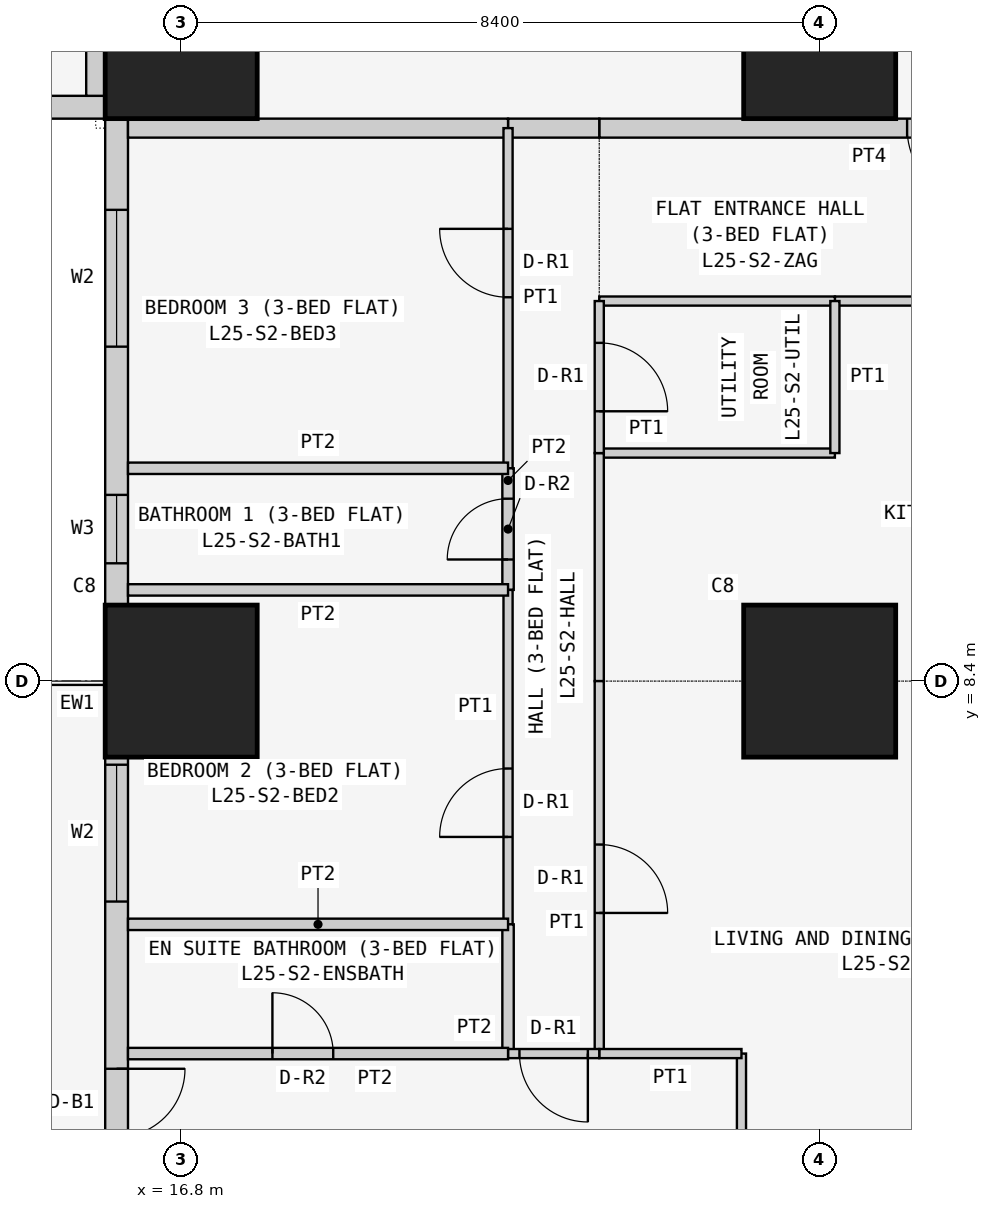
"""IFC4 building model, lengths in metres.
Left out: names, types, materials, properties, quantities, classifications, styles, units other than length and angle.
Written with IfcOpenShell. Run it as: python <this file> out.ifc"""

import sys

from ifc_helpers import new_model, si_unit, direction, frame, frame_2d, origin, origin_2d, place, context, subcontext, project, spatial, rectangle, extrude, element, fill, save


model = new_model("IFC4")
c1 = context("Model", 3, precision=1e-05, world=origin(), true_north=direction((0.0, 1.0)))
c2 = subcontext(c1, "Body", "Model", "MODEL_VIEW")
j1 = project(units=[si_unit("LENGTHUNIT", "METRE"), si_unit("PLANEANGLEUNIT", "RADIAN")], contexts=[c1])
p1 = place(None, origin())
s1 = spatial("IfcSite", under=j1, at=p1, CompositionType="ELEMENT")
p2 = place(p1, origin())
s2 = spatial("IfcBuilding", under=s1, at=p2, CompositionType="ELEMENT")
p3 = place(p2, frame((0.0, 0.0, 99.3)))
s3 = spatial("IfcBuildingStorey", under=s2, at=p3, CompositionType="ELEMENT", Elevation=99.3)
for number, where, z_axis, x_axis in (
    (1, (16.8, 8.4, 0.0), (0.0, 0.0, 1.0), (1.0, 0.0, 0.0)),
    (2, (16.8, 16.8, 0.0), (0.0, 0.0, 1.0), (1.0, 0.0, 0.0)),
    (3, (25.2, 8.4, 0.0), (0.0, 0.0, 1.0), (1.0, 0.0, 0.0)),
    (4, (25.2, 16.8, 0.0), (0.0, 0.0, 1.0), (1.0, 0.0, 0.0)),
):
    element("IfcColumn", number, at=place(p3, frame(where, z_axis=z_axis, x_axis=x_axis)), inside=s3, PredefinedType="COLUMN", context=c2, shape_type="SweptSolid", body=[
        extrude(rectangle(XDim=2.0, YDim=2.0, at=origin_2d()), origin(), (0.0, 0.0, 1.0), 3.6),
    ])
p4 = place(p3, frame((0.4, 15.95, 0.0), z_axis=(0.0, 0.0, 1.0), x_axis=(1.0, 0.0, 0.0)))
e5 = element("IfcWall", 5, at=p4, inside=s3, PredefinedType="SOLIDWALL", context=c2, shape_type="SweptSolid", body=[
    extrude(rectangle(XDim=15.7, YDim=0.3, at=frame_2d((7.85, 0.0))), origin(), (0.0, 0.0, 1.0), 3.35),
])
p5 = place(p4, frame((12.4, 0.0, 0.9)))
e6 = element("IfcOpeningElement", 6, at=p5, cuts=e5, PredefinedType="OPENING", context=c2, shape_type="SweptSolid", body=[
    extrude(rectangle(XDim=1.8, YDim=1.5, at=frame_2d((0.9, 0.75))), frame((0.0, 0.16, 0.0), z_axis=(0.0, -1.0, 0.0), x_axis=(1.0, 0.0, 0.0)), (0.0, 0.0, 1.0), 0.32),
])
p6 = place(p4, frame((9.55, 0.0, 1.5)))
e7 = element("IfcOpeningElement", 7, at=p6, cuts=e5, PredefinedType="OPENING", context=c2, shape_type="SweptSolid", body=[
    extrude(rectangle(XDim=0.9, YDim=0.7, at=frame_2d((0.45, 0.35))), frame((0.0, 0.16, 0.0), z_axis=(0.0, -1.0, 0.0), x_axis=(1.0, 0.0, 0.0)), (0.0, 0.0, 1.0), 0.32),
])
p7 = place(p4, frame((5.1, 0.0, 0.9)))
e8 = element("IfcOpeningElement", 8, at=p7, cuts=e5, PredefinedType="OPENING", context=c2, shape_type="SweptSolid", body=[
    extrude(rectangle(XDim=1.8, YDim=1.5, at=frame_2d((0.9, 0.75))), frame((0.0, 0.16, 0.0), z_axis=(0.0, -1.0, 0.0), x_axis=(1.0, 0.0, 0.0)), (0.0, 0.0, 1.0), 0.32),
])
p8 = place(p4, frame((2.0, 0.0, 0.0)))
e9 = element("IfcOpeningElement", 9, at=p8, cuts=e5, PredefinedType="OPENING", context=c2, shape_type="SweptSolid", body=[
    extrude(rectangle(XDim=0.9, YDim=2.4, at=frame_2d((0.45, 1.2))), frame((0.0, 0.16, 0.0), z_axis=(0.0, -1.0, 0.0), x_axis=(1.0, 0.0, 0.0)), (0.0, 0.0, 1.0), 0.32),
])
p9 = place(p4, frame((0.7, 0.0, 0.9)))
e10 = element("IfcOpeningElement", 10, at=p9, cuts=e5, PredefinedType="OPENING", context=c2, shape_type="SweptSolid", body=[
    extrude(rectangle(XDim=1.2, YDim=1.5, at=frame_2d((0.6, 0.75))), frame((0.0, 0.16, 0.0), z_axis=(0.0, -1.0, 0.0), x_axis=(1.0, 0.0, 0.0)), (0.0, 0.0, 1.0), 0.32),
])
p10 = place(p3, frame((15.95, 15.8, 0.0), z_axis=(0.0, 0.0, 1.0), x_axis=(0.0, -1.0, 0.0)))
e11 = element("IfcWall", 11, at=p10, inside=s3, PredefinedType="SOLIDWALL", context=c2, shape_type="SweptSolid", body=[
    extrude(rectangle(XDim=15.4, YDim=0.3, at=frame_2d((7.7, 0.0))), origin(), (0.0, 0.0, 1.0), 3.35),
])
p11 = place(p10, frame((1.2, 0.0, 0.9)))
e12 = element("IfcOpeningElement", 12, at=p11, cuts=e11, PredefinedType="OPENING", context=c2, shape_type="SweptSolid", body=[
    extrude(rectangle(XDim=1.8, YDim=1.5, at=frame_2d((0.9, 0.75))), frame((0.0, 0.16, 0.0), z_axis=(0.0, -1.0, 0.0), x_axis=(1.0, 0.0, 0.0)), (0.0, 0.0, 1.0), 0.32),
])
p12 = place(p10, frame((4.95, 0.0, 1.5)))
e13 = element("IfcOpeningElement", 13, at=p12, cuts=e11, PredefinedType="OPENING", context=c2, shape_type="SweptSolid", body=[
    extrude(rectangle(XDim=0.9, YDim=0.7, at=frame_2d((0.45, 0.35))), frame((0.0, 0.16, 0.0), z_axis=(0.0, -1.0, 0.0), x_axis=(1.0, 0.0, 0.0)), (0.0, 0.0, 1.0), 0.32),
])
p13 = place(p10, frame((8.5, 0.0, 0.9)))
e14 = element("IfcOpeningElement", 14, at=p13, cuts=e11, PredefinedType="OPENING", context=c2, shape_type="SweptSolid", body=[
    extrude(rectangle(XDim=1.8, YDim=1.5, at=frame_2d((0.9, 0.75))), frame((0.0, 0.16, 0.0), z_axis=(0.0, -1.0, 0.0), x_axis=(1.0, 0.0, 0.0)), (0.0, 0.0, 1.0), 0.32),
])
p14 = place(p10, frame((12.5, 0.0, 0.0)))
e15 = element("IfcOpeningElement", 15, at=p14, cuts=e11, PredefinedType="OPENING", context=c2, shape_type="SweptSolid", body=[
    extrude(rectangle(XDim=0.9, YDim=2.4, at=frame_2d((0.45, 1.2))), frame((0.0, 0.16, 0.0), z_axis=(0.0, -1.0, 0.0), x_axis=(1.0, 0.0, 0.0)), (0.0, 0.0, 1.0), 0.32),
])
p15 = place(p10, frame((13.5, 0.0, 0.9)))
e16 = element("IfcOpeningElement", 16, at=p15, cuts=e11, PredefinedType="OPENING", context=c2, shape_type="SweptSolid", body=[
    extrude(rectangle(XDim=1.2, YDim=1.5, at=frame_2d((0.6, 0.75))), frame((0.0, 0.16, 0.0), z_axis=(0.0, -1.0, 0.0), x_axis=(1.0, 0.0, 0.0)), (0.0, 0.0, 1.0), 0.32),
])
p16 = place(p3, frame((29.4, 15.675, 0.0), z_axis=(0.0, 0.0, 1.0), x_axis=(-1.0, 0.0, 0.0)))
e17 = element("IfcWall", 17, at=p16, inside=s3, PredefinedType="PARTITIONING", context=c2, shape_type="SweptSolid", body=[
    extrude(rectangle(XDim=7.1, YDim=0.25, at=frame_2d((3.55, 0.0))), origin(), (0.0, 0.0, 1.0), 3.35),
])
p17 = place(p16, frame((2.05, 0.0, 0.0)))
e18 = element("IfcOpeningElement", 18, at=p17, cuts=e17, PredefinedType="OPENING", context=c2, shape_type="SweptSolid", body=[
    extrude(rectangle(XDim=1.0, YDim=2.1, at=frame_2d((0.5, 1.05))), frame((0.0, 0.135, 0.0), z_axis=(0.0, -1.0, 0.0), x_axis=(1.0, 0.0, 0.0)), (0.0, 0.0, 1.0), 0.27),
])
p18 = place(p3, frame((22.3, 15.675, 0.0), z_axis=(0.0, 0.0, 1.0), x_axis=(-1.0, 0.0, 0.0)))
e19 = element("IfcWall", 19, at=p18, inside=s3, PredefinedType="PARTITIONING", context=c2, shape_type="SweptSolid", body=[
    extrude(rectangle(XDim=1.2, YDim=0.25, at=frame_2d((0.6, 0.0))), origin(), (0.0, 0.0, 1.0), 3.35),
])
for number, where, z_axis, x_axis in (
    (20, (21.1, 15.675, 0.0), (0.0, 0.0, 1.0), (-1.0, 0.0, 0.0)),
    (21, (15.675, 16.1, 0.0), (0.0, 0.0, 1.0), (0.0, 1.0, 0.0)),
):
    element("IfcWall", number, at=place(p3, frame(where, z_axis=z_axis, x_axis=x_axis)), inside=s3, PredefinedType="PARTITIONING", context=c2, shape_type="SweptSolid", body=[
        extrude(rectangle(XDim=5.0, YDim=0.25, at=frame_2d((2.5, 0.0))), origin(), (0.0, 0.0, 1.0), 3.35),
    ])
p19 = place(p3, frame((29.4, 13.4, 0.0), z_axis=(0.0, 0.0, 1.0), x_axis=(-1.0, 0.0, 0.0)))
e22 = element("IfcWall", 22, at=p19, inside=s3, PredefinedType="PARTITIONING", context=c2, shape_type="SweptSolid", body=[
    extrude(rectangle(XDim=4.0, YDim=0.12, at=frame_2d((2.0, 0.0))), origin(), (0.0, 0.0, 1.0), 3.35),
])
p20 = place(p19, frame((1.05, 0.0, 0.0)))
e23 = element("IfcOpeningElement", 23, at=p20, cuts=e22, PredefinedType="OPENING", context=c2, shape_type="SweptSolid", body=[
    extrude(rectangle(XDim=0.9, YDim=2.1, at=frame_2d((0.45, 1.05))), frame((0.0, 0.07, 0.0), z_axis=(0.0, -1.0, 0.0), x_axis=(1.0, 0.0, 0.0)), (0.0, 0.0, 1.0), 0.14),
])
for number, where, z_axis, x_axis in (
    (24, (25.4, 13.4, 0.0), (0.0, 0.0, 1.0), (-1.0, 0.0, 0.0)),
    (25, (22.3, 11.4, 0.0), (0.0, 0.0, 1.0), (1.0, 0.0, 0.0)),
):
    element("IfcWall", number, at=place(p3, frame(where, z_axis=z_axis, x_axis=x_axis)), inside=s3, PredefinedType="PARTITIONING", context=c2, shape_type="SweptSolid", body=[
        extrude(rectangle(XDim=3.1, YDim=0.12, at=frame_2d((1.55, 0.0))), origin(), (0.0, 0.0, 1.0), 3.35),
    ])
p21 = place(p3, frame((25.4, 11.4, 0.0), z_axis=(0.0, 0.0, 1.0), x_axis=(0.0, 1.0, 0.0)))
e26 = element("IfcWall", 26, at=p21, inside=s3, PredefinedType="PARTITIONING", context=c2, shape_type="SweptSolid", body=[
    extrude(rectangle(XDim=2.0, YDim=0.12, at=frame_2d((1.0, 0.0))), origin(), (0.0, 0.0, 1.0), 3.35),
])
p22 = place(p3, frame((22.3, 8.4, 0.0), z_axis=(0.0, 0.0, 1.0), x_axis=(0.0, 1.0, 0.0)))
e27 = element("IfcWall", 27, at=p22, inside=s3, PredefinedType="PARTITIONING", context=c2, shape_type="SweptSolid", body=[
    extrude(rectangle(XDim=3.0, YDim=0.12, at=frame_2d((1.5, 0.0))), origin(), (0.0, 0.0, 1.0), 3.35),
])
p23 = place(p3, frame((22.3, 11.4, 0.0), z_axis=(0.0, 0.0, 1.0), x_axis=(0.0, 1.0, 0.0)))
e28 = element("IfcWall", 28, at=p23, inside=s3, PredefinedType="PARTITIONING", context=c2, shape_type="SweptSolid", body=[
    extrude(rectangle(XDim=2.0, YDim=0.12, at=frame_2d((1.0, 0.0))), origin(), (0.0, 0.0, 1.0), 3.35),
])
p24 = place(p23, frame((0.55, 0.0, 0.0)))
e29 = element("IfcOpeningElement", 29, at=p24, cuts=e28, PredefinedType="OPENING", context=c2, shape_type="SweptSolid", body=[
    extrude(rectangle(XDim=0.9, YDim=2.1, at=frame_2d((0.45, 1.05))), frame((0.0, 0.07, 0.0), z_axis=(0.0, -1.0, 0.0), x_axis=(1.0, 0.0, 0.0)), (0.0, 0.0, 1.0), 0.14),
])
p25 = place(p3, frame((22.3, 3.5, 0.0), z_axis=(0.0, 0.0, 1.0), x_axis=(0.0, 1.0, 0.0)))
e30 = element("IfcWall", 30, at=p25, inside=s3, PredefinedType="PARTITIONING", context=c2, shape_type="SweptSolid", body=[
    extrude(rectangle(XDim=4.9, YDim=0.12, at=frame_2d((2.45, 0.0))), origin(), (0.0, 0.0, 1.0), 3.35),
])
p26 = place(p25, frame((1.85, 0.0, 0.0)))
e31 = element("IfcOpeningElement", 31, at=p26, cuts=e30, PredefinedType="OPENING", context=c2, shape_type="SweptSolid", body=[
    extrude(rectangle(XDim=0.9, YDim=2.1, at=frame_2d((0.45, 1.05))), frame((0.0, 0.07, 0.0), z_axis=(0.0, -1.0, 0.0), x_axis=(1.0, 0.0, 0.0)), (0.0, 0.0, 1.0), 0.14),
])
p27 = place(p3, frame((24.171, -0.65, 0.0), z_axis=(0.0, 0.0, 1.0), x_axis=(0.0, 1.0, 0.0)))
e32 = element("IfcWall", 32, at=p27, inside=s3, PredefinedType="PARTITIONING", context=c2, shape_type="SweptSolid", body=[
    extrude(rectangle(XDim=4.15, YDim=0.12, at=frame_2d((2.075, 0.0))), origin(), (0.0, 0.0, 1.0), 3.35),
])
p28 = place(p3, frame((24.171, 3.5, 0.0), z_axis=(0.0, 0.0, 1.0), x_axis=(-1.0, 0.0, 0.0)))
e33 = element("IfcWall", 33, at=p28, inside=s3, PredefinedType="PARTITIONING", context=c2, shape_type="SweptSolid", body=[
    extrude(rectangle(XDim=1.871, YDim=0.12, at=frame_2d((0.936, 0.0))), origin(), (0.0, 0.0, 1.0), 3.35),
])
p29 = place(p3, frame((21.1, 11.2, 0.0), z_axis=(0.0, 0.0, 1.0), x_axis=(0.0, 1.0, 0.0)))
e34 = element("IfcWall", 34, at=p29, inside=s3, PredefinedType="PARTITIONING", context=c2, shape_type="SweptSolid", body=[
    extrude(rectangle(XDim=4.475, YDim=0.12, at=frame_2d((2.238, 0.0))), origin(), (0.0, 0.0, 1.0), 2.667),
])
p30 = place(p29, frame((2.25, 0.0, 0.0)))
e35 = element("IfcOpeningElement", 35, at=p30, cuts=e34, PredefinedType="OPENING", context=c2, shape_type="SweptSolid", body=[
    extrude(rectangle(XDim=0.9, YDim=2.1, at=frame_2d((0.45, 1.05))), frame((0.0, 0.07, 0.0), z_axis=(0.0, -1.0, 0.0), x_axis=(1.0, 0.0, 0.0)), (0.0, 0.0, 1.0), 0.14),
])
p31 = place(p3, frame((21.1, 9.6, 0.0), z_axis=(0.0, 0.0, 1.0), x_axis=(0.0, 1.0, 0.0)))
e36 = element("IfcWall", 36, at=p31, inside=s3, PredefinedType="PARTITIONING", context=c2, shape_type="SweptSolid", body=[
    extrude(rectangle(XDim=1.6, YDim=0.15, at=frame_2d((0.8, 0.0))), origin(), (0.0, 0.0, 1.0), 2.667),
])
p32 = place(p31, frame((0.4, 0.0, 0.0)))
e37 = element("IfcOpeningElement", 37, at=p32, cuts=e36, PredefinedType="OPENING", context=c2, shape_type="SweptSolid", body=[
    extrude(rectangle(XDim=0.8, YDim=2.1, at=frame_2d((0.4, 1.05))), frame((0.0, 0.085, 0.0), z_axis=(0.0, -1.0, 0.0), x_axis=(1.0, 0.0, 0.0)), (0.0, 0.0, 1.0), 0.17),
])
p33 = place(p3, frame((21.1, 5.2, 0.0), z_axis=(0.0, 0.0, 1.0), x_axis=(0.0, 1.0, 0.0)))
e38 = element("IfcWall", 38, at=p33, inside=s3, PredefinedType="PARTITIONING", context=c2, shape_type="SweptSolid", body=[
    extrude(rectangle(XDim=4.4, YDim=0.12, at=frame_2d((2.2, 0.0))), origin(), (0.0, 0.0, 1.0), 2.667),
])
p34 = place(p33, frame((1.15, 0.0, 0.0)))
e39 = element("IfcOpeningElement", 39, at=p34, cuts=e38, PredefinedType="OPENING", context=c2, shape_type="SweptSolid", body=[
    extrude(rectangle(XDim=0.9, YDim=2.1, at=frame_2d((0.45, 1.05))), frame((0.0, 0.07, 0.0), z_axis=(0.0, -1.0, 0.0), x_axis=(1.0, 0.0, 0.0)), (0.0, 0.0, 1.0), 0.14),
])
p35 = place(p3, frame((21.1, 3.5, 0.0), z_axis=(0.0, 0.0, 1.0), x_axis=(0.0, 1.0, 0.0)))
e40 = element("IfcWall", 40, at=p35, inside=s3, PredefinedType="PARTITIONING", context=c2, shape_type="SweptSolid", body=[
    extrude(rectangle(XDim=1.7, YDim=0.15, at=frame_2d((0.85, 0.0))), origin(), (0.0, 0.0, 1.0), 2.667),
])
p36 = place(p3, frame((22.3, 3.5, 0.0), z_axis=(0.0, 0.0, 1.0), x_axis=(-1.0, 0.0, 0.0)))
e41 = element("IfcWall", 41, at=p36, inside=s3, PredefinedType="PARTITIONING", context=c2, shape_type="SweptSolid", body=[
    extrude(rectangle(XDim=1.2, YDim=0.12, at=frame_2d((0.6, 0.0))), origin(), (0.0, 0.0, 1.0), 3.35),
])
p37 = place(p36, frame((0.15, 0.0, 0.0)))
e42 = element("IfcOpeningElement", 42, at=p37, cuts=e41, PredefinedType="OPENING", context=c2, shape_type="SweptSolid", body=[
    extrude(rectangle(XDim=0.9, YDim=2.1, at=frame_2d((0.45, 1.05))), frame((0.0, 0.07, 0.0), z_axis=(0.0, -1.0, 0.0), x_axis=(1.0, 0.0, 0.0)), (0.0, 0.0, 1.0), 0.14),
])
for number, where, z_axis, x_axis in (
    (43, (21.1, 11.2, 0.0), (0.0, 0.0, 1.0), (-1.0, 0.0, 0.0)),
    (44, (21.1, 9.6, 0.0), (0.0, 0.0, 1.0), (-1.0, 0.0, 0.0)),
    (45, (21.1, 5.2, 0.0), (0.0, 0.0, 1.0), (-1.0, 0.0, 0.0)),
):
    element("IfcWall", number, at=place(p3, frame(where, z_axis=z_axis, x_axis=x_axis)), inside=s3, PredefinedType="PARTITIONING", context=c2, shape_type="SweptSolid", body=[
        extrude(rectangle(XDim=5.0, YDim=0.15, at=frame_2d((2.5, 0.0))), origin(), (0.0, 0.0, 1.0), 3.35),
    ])
p38 = place(p3, frame((21.1, 3.5, 0.0), z_axis=(0.0, 0.0, 1.0), x_axis=(-1.0, 0.0, 0.0)))
e46 = element("IfcWall", 46, at=p38, inside=s3, PredefinedType="PARTITIONING", context=c2, shape_type="SweptSolid", body=[
    extrude(rectangle(XDim=5.0, YDim=0.15, at=frame_2d((2.5, 0.0))), origin(), (0.0, 0.0, 1.0), 3.35),
])
p39 = place(p38, frame((2.3, 0.0, 0.0)))
e47 = element("IfcOpeningElement", 47, at=p39, cuts=e46, PredefinedType="OPENING", context=c2, shape_type="SweptSolid", body=[
    extrude(rectangle(XDim=0.8, YDim=2.1, at=frame_2d((0.4, 1.05))), frame((0.0, 0.085, 0.0), z_axis=(0.0, -1.0, 0.0), x_axis=(1.0, 0.0, 0.0)), (0.0, 0.0, 1.0), 0.17),
])
p40 = place(p11, origin())
e48 = element("IfcWindow", 48, at=p40, inside=s3, PartitioningType="SINGLE_PANEL", PredefinedType="WINDOW", context=c2, shape_type="SweptSolid", body=[
    extrude(rectangle(XDim=1.8, YDim=1.5, at=frame_2d((0.9, 0.75))), frame((0.0, 0.03, 0.0), z_axis=(0.0, -1.0, 0.0), x_axis=(1.0, 0.0, 0.0)), (0.0, 0.0, 1.0), 0.06),
])
fill(e12, e48)
p41 = place(p12, origin())
e49 = element("IfcWindow", 49, at=p41, inside=s3, PartitioningType="SINGLE_PANEL", PredefinedType="WINDOW", context=c2, shape_type="SweptSolid", body=[
    extrude(rectangle(XDim=0.9, YDim=0.7, at=frame_2d((0.45, 0.35))), frame((0.0, 0.03, 0.0), z_axis=(0.0, -1.0, 0.0), x_axis=(1.0, 0.0, 0.0)), (0.0, 0.0, 1.0), 0.06),
])
fill(e13, e49)
p42 = place(p13, origin())
e50 = element("IfcWindow", 50, at=p42, inside=s3, PartitioningType="SINGLE_PANEL", PredefinedType="WINDOW", context=c2, shape_type="SweptSolid", body=[
    extrude(rectangle(XDim=1.8, YDim=1.5, at=frame_2d((0.9, 0.75))), frame((0.0, 0.03, 0.0), z_axis=(0.0, -1.0, 0.0), x_axis=(1.0, 0.0, 0.0)), (0.0, 0.0, 1.0), 0.06),
])
fill(e14, e50)
p43 = place(p14, origin())
e51 = element("IfcDoor", 51, at=p43, inside=s3, OperationType="SINGLE_SWING_LEFT", PredefinedType="DOOR", context=c2, shape_type="SweptSolid", body=[
    extrude(rectangle(XDim=0.9, YDim=2.4, at=frame_2d((0.45, 1.2))), frame((0.0, 0.025, 0.0), z_axis=(0.0, -1.0, 0.0), x_axis=(1.0, 0.0, 0.0)), (0.0, 0.0, 1.0), 0.05),
])
fill(e15, e51)
p44 = place(p17, origin())
e52 = element("IfcDoor", 52, at=p44, inside=s3, OperationType="SINGLE_SWING_LEFT", PredefinedType="DOOR", context=c2, shape_type="SweptSolid", body=[
    extrude(rectangle(XDim=1.0, YDim=2.1, at=frame_2d((0.5, 1.05))), frame((0.0, 0.025, 0.0), z_axis=(0.0, -1.0, 0.0), x_axis=(1.0, 0.0, 0.0)), (0.0, 0.0, 1.0), 0.05),
])
fill(e18, e52)
p45 = place(p24, frame((0.9, 0.0, 0.0), z_axis=(0.0, 0.0, 1.0), x_axis=(-1.0, 0.0, 0.0)))
e53 = element("IfcDoor", 53, at=p45, inside=s3, OperationType="SINGLE_SWING_RIGHT", PredefinedType="DOOR", context=c2, shape_type="SweptSolid", body=[
    extrude(rectangle(XDim=0.9, YDim=2.1, at=frame_2d((0.45, 1.05))), frame((0.0, 0.025, 0.0), z_axis=(0.0, -1.0, 0.0), x_axis=(1.0, 0.0, 0.0)), (0.0, 0.0, 1.0), 0.05),
])
fill(e29, e53)
p46 = place(p26, frame((0.9, 0.0, 0.0), z_axis=(0.0, 0.0, 1.0), x_axis=(-1.0, 0.0, 0.0)))
e54 = element("IfcDoor", 54, at=p46, inside=s3, OperationType="SINGLE_SWING_RIGHT", PredefinedType="DOOR", context=c2, shape_type="SweptSolid", body=[
    extrude(rectangle(XDim=0.9, YDim=2.1, at=frame_2d((0.45, 1.05))), frame((0.0, 0.025, 0.0), z_axis=(0.0, -1.0, 0.0), x_axis=(1.0, 0.0, 0.0)), (0.0, 0.0, 1.0), 0.05),
])
fill(e31, e54)
p47 = place(p30, origin())
e55 = element("IfcDoor", 55, at=p47, inside=s3, OperationType="SINGLE_SWING_RIGHT", PredefinedType="DOOR", context=c2, shape_type="SweptSolid", body=[
    extrude(rectangle(XDim=0.9, YDim=2.1, at=frame_2d((0.45, 1.05))), frame((0.0, 0.025, 0.0), z_axis=(0.0, -1.0, 0.0), x_axis=(1.0, 0.0, 0.0)), (0.0, 0.0, 1.0), 0.05),
])
fill(e35, e55)
p48 = place(p32, origin())
e56 = element("IfcDoor", 56, at=p48, inside=s3, OperationType="SINGLE_SWING_LEFT", PredefinedType="DOOR", context=c2, shape_type="SweptSolid", body=[
    extrude(rectangle(XDim=0.8, YDim=2.1, at=frame_2d((0.4, 1.05))), frame((0.0, 0.025, 0.0), z_axis=(0.0, -1.0, 0.0), x_axis=(1.0, 0.0, 0.0)), (0.0, 0.0, 1.0), 0.05),
])
fill(e37, e56)
p49 = place(p34, origin())
e57 = element("IfcDoor", 57, at=p49, inside=s3, OperationType="SINGLE_SWING_LEFT", PredefinedType="DOOR", context=c2, shape_type="SweptSolid", body=[
    extrude(rectangle(XDim=0.9, YDim=2.1, at=frame_2d((0.45, 1.05))), frame((0.0, 0.025, 0.0), z_axis=(0.0, -1.0, 0.0), x_axis=(1.0, 0.0, 0.0)), (0.0, 0.0, 1.0), 0.05),
])
fill(e39, e57)
p50 = place(p37, origin())
e58 = element("IfcDoor", 58, at=p50, inside=s3, OperationType="SINGLE_SWING_LEFT", PredefinedType="DOOR", context=c2, shape_type="SweptSolid", body=[
    extrude(rectangle(XDim=0.9, YDim=2.1, at=frame_2d((0.45, 1.05))), frame((0.0, 0.025, 0.0), z_axis=(0.0, -1.0, 0.0), x_axis=(1.0, 0.0, 0.0)), (0.0, 0.0, 1.0), 0.05),
])
fill(e42, e58)
p51 = place(p39, frame((0.8, 0.0, 0.0), z_axis=(0.0, 0.0, 1.0), x_axis=(-1.0, 0.0, 0.0)))
e59 = element("IfcDoor", 59, at=p51, inside=s3, OperationType="SINGLE_SWING_LEFT", PredefinedType="DOOR", context=c2, shape_type="SweptSolid", body=[
    extrude(rectangle(XDim=0.8, YDim=2.1, at=frame_2d((0.4, 1.05))), frame((0.0, 0.025, 0.0), z_axis=(0.0, -1.0, 0.0), x_axis=(1.0, 0.0, 0.0)), (0.0, 0.0, 1.0), 0.05),
])
fill(e47, e59)
save(model, sys.argv[1])
